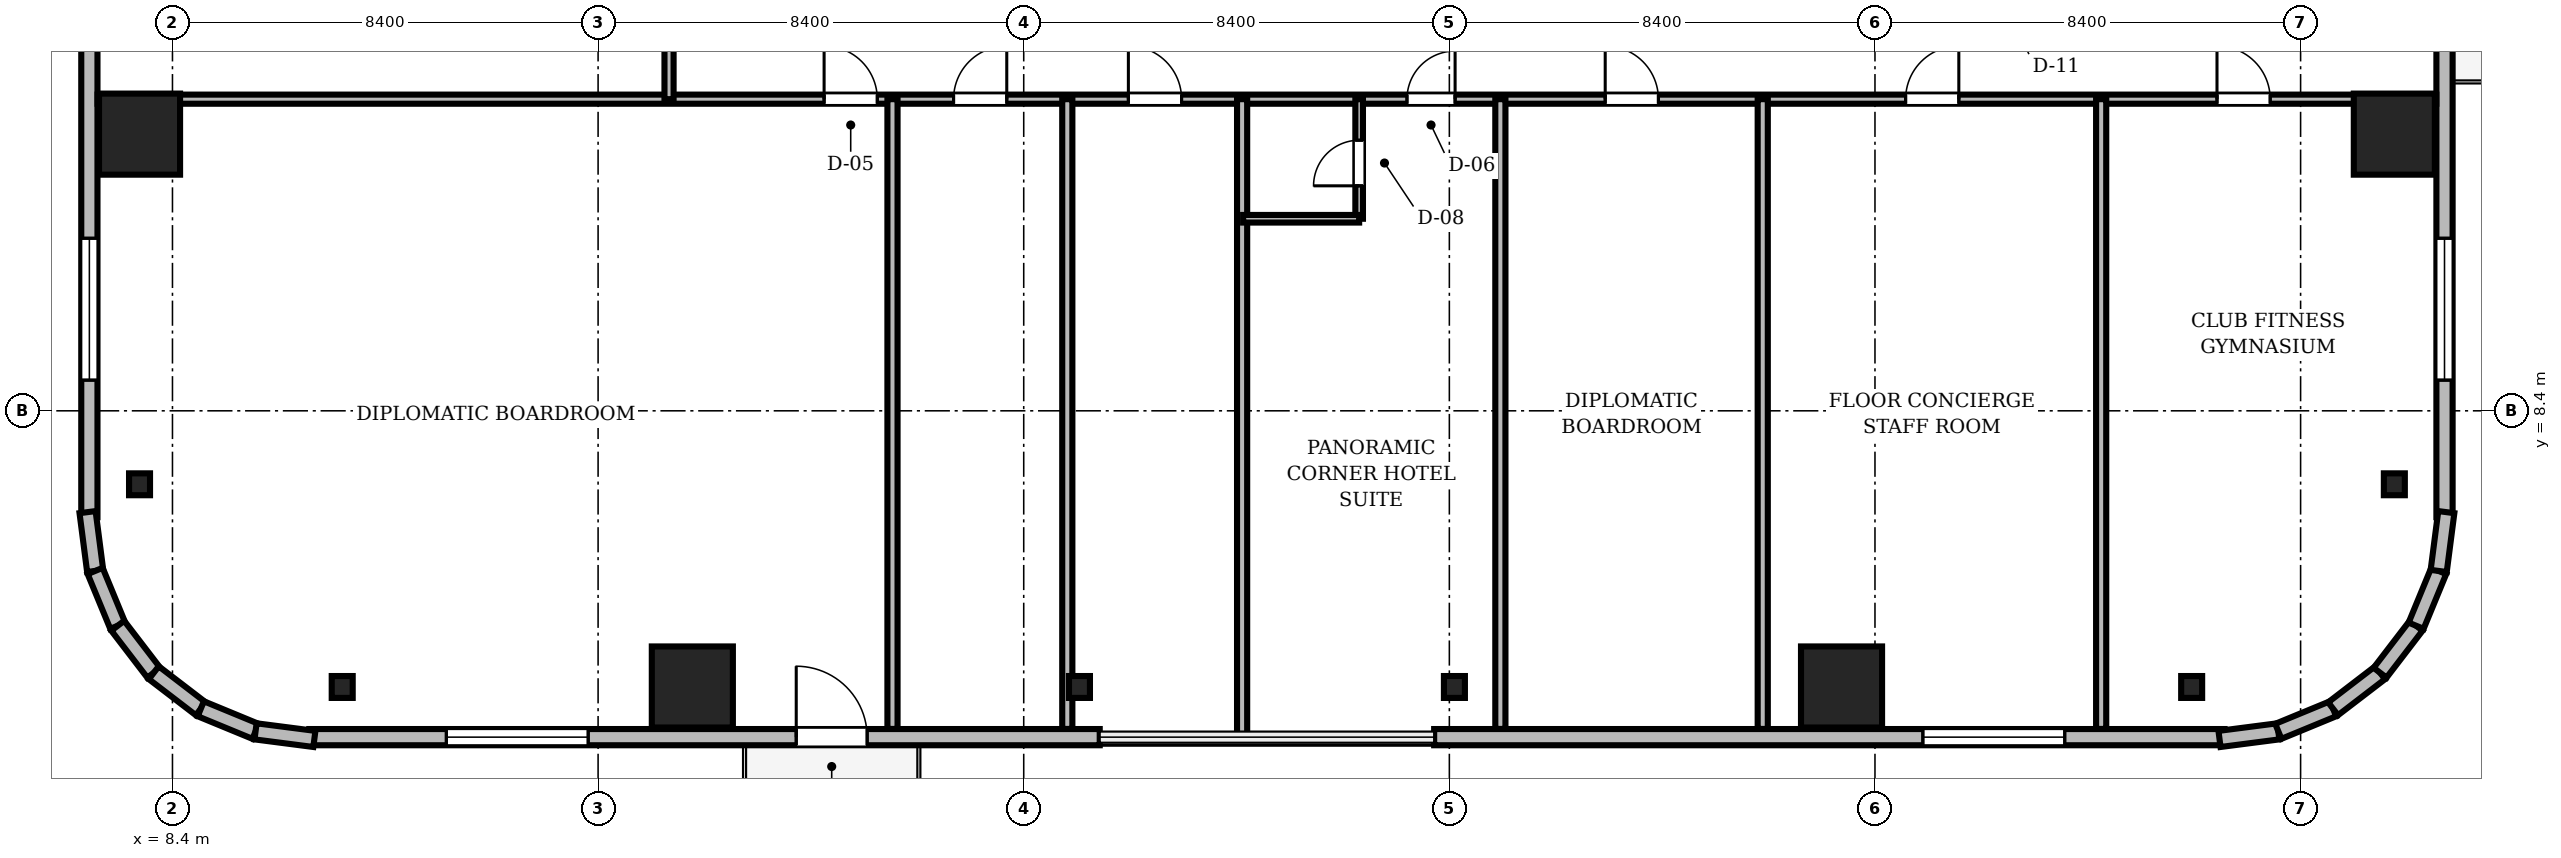
"""IFC4 building model, lengths in metres.
Left out: names, types, materials, properties, quantities, classifications, styles, units other than length and angle.
Written with IfcOpenShell. Run it as: python <this file> out.ifc"""

import sys

from ifc_helpers import new_model, si_unit, direction, frame, frame_2d, origin, origin_2d, place, context, subcontext, project, spatial, rectangle, i_section, extrude, source, transform, mapped, element, fill, save


model = new_model("IFC4")
c1 = context("Model", 3, precision=1e-05, world=origin(), true_north=direction((0.0, 1.0)))
c2 = subcontext(c1, "Body", "Model", "MODEL_VIEW")
j1 = project(units=[si_unit("LENGTHUNIT", "METRE"), si_unit("PLANEANGLEUNIT", "RADIAN")], contexts=[c1])
p1 = place(None, origin())
s1 = spatial("IfcSite", under=j1, at=p1, CompositionType="ELEMENT")
p2 = place(p1, origin())
s2 = spatial("IfcBuilding", under=s1, at=p2, CompositionType="ELEMENT")
p3 = place(p2, frame((0.0, 0.0, 111.3)))
s3 = spatial("IfcBuildingStorey", under=s2, at=p3, CompositionType="ELEMENT", Elevation=111.3)
m1 = source(origin(), c2, "Body", "SweptSolid", [
    extrude(rectangle(XDim=1.6, YDim=1.6, at=origin_2d()), origin(), (0.0, 0.0, 1.0), 3.46),
])
for number, where, z_axis, x_axis in (
    (1, (18.66, 2.95, 0.0), (0.0, 0.0, 1.0), (1.0, 0.0, 0.0)),
    (2, (41.34, 2.95, 0.0), (0.0, 0.0, 1.0), (1.0, 0.0, 0.0)),
    (3, (52.25, 13.86, 0.0), (0.0, 0.0, 1.0), (1.0, 0.0, 0.0)),
    (4, (7.75, 13.86, 0.0), (0.0, 0.0, 1.0), (1.0, 0.0, 0.0)),
):
    element("IfcColumn", number, at=place(p3, frame(where, z_axis=z_axis, x_axis=x_axis)), inside=s3, PredefinedType="COLUMN", context=c2, shape_type="MappedRepresentation", body=[
        mapped(m1, transform((0.0, 0.0, 0.0), scale=1.0)),
    ])
m2 = source(origin(), c2, "Body", "SweptSolid", [
    extrude(i_section(OverallWidth=0.414, OverallDepth=0.432, WebThickness=0.026, FlangeThickness=0.04, FilletRadius=0.015, at=origin_2d()), origin(), (0.0, 0.0, 1.0), 3.46),
])
for number, where, z_axis, x_axis in (
    (5, (11.75, 2.95, 0.0), (0.0, 0.0, 1.0), (1.0, 0.0, 0.0)),
    (6, (26.3, 2.95, 0.0), (0.0, 0.0, 1.0), (1.0, 0.0, 0.0)),
    (7, (33.7, 2.95, 0.0), (0.0, 0.0, 1.0), (1.0, 0.0, 0.0)),
    (8, (48.25, 2.95, 0.0), (0.0, 0.0, 1.0), (1.0, 0.0, 0.0)),
    (9, (52.25, 6.95, 0.0), (0.0, 0.0, 1.0), (1.0, 0.0, 0.0)),
    (10, (7.75, 6.95, 0.0), (0.0, 0.0, 1.0), (1.0, 0.0, 0.0)),
):
    element("IfcColumn", number, at=place(p3, frame(where, z_axis=z_axis, x_axis=x_axis)), inside=s3, PredefinedType="COLUMN", context=c2, shape_type="MappedRepresentation", body=[
        mapped(m2, transform((0.0, 0.0, 0.0), scale=1.0)),
    ])
m3 = source(origin(), c2, "Body", "SweptSolid", [
    extrude(rectangle(XDim=15.6, YDim=0.32, at=frame_2d((7.8, 0.0))), origin(), (0.0, 0.0, 1.0), 3.46),
])
p4 = place(p3, frame((11.1, 1.96, 0.0), z_axis=(0.0, 0.0, 1.0), x_axis=(1.0, 0.0, 0.0)))
e11 = element("IfcWall", 11, at=p4, inside=s3, PredefinedType="SOLIDWALL", context=c2, shape_type="MappedRepresentation", body=[
    mapped(m3, transform((0.0, 0.0, 0.0), scale=1.0)),
])
m4 = source(origin(), c2, "Body", "SweptSolid", [
    extrude(rectangle(XDim=1.4, YDim=2.3, at=frame_2d((0.7, 1.15))), frame((0.0, 0.17, 0.0), z_axis=(0.0, -1.0, 0.0), x_axis=(1.0, 0.0, 0.0)), (0.0, 0.0, 1.0), 0.34),
])
p5 = place(p4, frame((9.61, 0.0, 0.0)))
e12 = element("IfcOpeningElement", 12, at=p5, cuts=e11, PredefinedType="OPENING", context=c2, shape_type="MappedRepresentation", body=[
    mapped(m4, transform((0.0, 0.0, 0.0), scale=1.0)),
])
m5 = source(origin(), c2, "Body", "SweptSolid", [
    extrude(rectangle(XDim=2.8, YDim=2.4, at=frame_2d((1.4, 1.2))), frame((0.0, 0.17, 0.0), z_axis=(0.0, -1.0, 0.0), x_axis=(1.0, 0.0, 0.0)), (0.0, 0.0, 1.0), 0.34),
])
p6 = place(p4, frame((2.705, 0.0, 0.72)))
e13 = element("IfcOpeningElement", 13, at=p6, cuts=e11, PredefinedType="OPENING", context=c2, shape_type="MappedRepresentation", body=[
    mapped(m5, transform((0.0, 0.0, 0.0), scale=1.0)),
])
p7 = place(p3, frame((33.3, 1.96, 0.0), z_axis=(0.0, 0.0, 1.0), x_axis=(1.0, 0.0, 0.0)))
e14 = element("IfcWall", 14, at=p7, inside=s3, PredefinedType="SOLIDWALL", context=c2, shape_type="MappedRepresentation", body=[
    mapped(m3, transform((0.0, 0.0, 0.0), scale=1.0)),
])
p8 = place(p7, frame((9.645, 0.0, 0.72)))
e15 = element("IfcOpeningElement", 15, at=p8, cuts=e14, PredefinedType="OPENING", context=c2, shape_type="MappedRepresentation", body=[
    mapped(m5, transform((0.0, 0.0, 0.0), scale=1.0)),
])
p9 = place(p3, frame((6.76, 21.9, 0.0), z_axis=(0.0, 0.0, 1.0), x_axis=(0.0, -1.0, 0.0)))
e16 = element("IfcWall", 16, at=p9, inside=s3, PredefinedType="SOLIDWALL", context=c2, shape_type="MappedRepresentation", body=[
    mapped(m3, transform((0.0, 0.0, 0.0), scale=1.0)),
])
p10 = place(p9, frame((10.095, 0.0, 0.72)))
e17 = element("IfcOpeningElement", 17, at=p10, cuts=e16, PredefinedType="OPENING", context=c2, shape_type="MappedRepresentation", body=[
    mapped(m5, transform((0.0, 0.0, 0.0), scale=1.0)),
])
p11 = place(p3, frame((53.24, 6.3, 0.0), z_axis=(0.0, 0.0, 1.0), x_axis=(0.0, 1.0, 0.0)))
e18 = element("IfcWall", 18, at=p11, inside=s3, PredefinedType="SOLIDWALL", context=c2, shape_type="MappedRepresentation", body=[
    mapped(m3, transform((0.0, 0.0, 0.0), scale=1.0)),
])
p12 = place(p11, frame((9.61, 0.0, 0.0)))
e19 = element("IfcOpeningElement", 19, at=p12, cuts=e18, PredefinedType="OPENING", context=c2, shape_type="MappedRepresentation", body=[
    mapped(m4, transform((0.0, 0.0, 0.0), scale=1.0)),
])
p13 = place(p11, frame((2.705, 0.0, 0.72)))
e20 = element("IfcOpeningElement", 20, at=p13, cuts=e18, PredefinedType="OPENING", context=c2, shape_type="MappedRepresentation", body=[
    mapped(m5, transform((0.0, 0.0, 0.0), scale=1.0)),
])
m6 = source(origin(), c2, "Body", "SweptSolid", [
    extrude(rectangle(XDim=1.171, YDim=0.32, at=frame_2d((0.585, 0.0))), origin(), (0.0, 0.0, 1.0), 3.46),
])
p14 = place(p3, frame((6.724, 6.401, 0.0), z_axis=(0.0, 0.0, 1.0), x_axis=(0.128269133229, -0.991739395941, 0.0)))
e21 = element("IfcWall", 21, at=p14, inside=s3, PredefinedType="SOLIDWALL", context=c2, shape_type="MappedRepresentation", body=[
    mapped(m6, transform((0.0, 0.0, 0.0), scale=1.0)),
])
m7 = source(origin(), c2, "Body", "SweptSolid", [
    extrude(rectangle(XDim=1.169, YDim=0.32, at=frame_2d((0.584, 0.0))), origin(), (0.0, 0.0, 1.0), 3.46),
])
for number, where, z_axis, x_axis in (
    (22, (6.875, 5.24, 0.0), (0.0, 0.0, 1.0), (0.381, -0.925, 0.0)),
    (23, (7.32, 4.159, 0.0), (0.0, 0.0, 1.0), (0.608, -0.794, 0.0)),
):
    element("IfcWall", number, at=place(p3, frame(where, z_axis=z_axis, x_axis=x_axis)), inside=s3, PredefinedType="SOLIDWALL", context=c2, shape_type="MappedRepresentation", body=[
        mapped(m7, transform((0.0, 0.0, 0.0), scale=1.0)),
    ])
m8 = source(origin(), c2, "Body", "SweptSolid", [
    extrude(rectangle(XDim=1.169, YDim=0.32, at=frame_2d((0.584, 0.0))), origin(), (0.0, 0.0, 1.0), 3.46),
])
p15 = place(p3, frame((8.031, 3.231, 0.0), z_axis=(0.0, 0.0, 1.0), x_axis=(0.793663520347, -0.608356981114, 0.0)))
e24 = element("IfcWall", 24, at=p15, inside=s3, PredefinedType="SOLIDWALL", context=c2, shape_type="MappedRepresentation", body=[
    mapped(m8, transform((0.0, 0.0, 0.0), scale=1.0)),
])
m9 = source(origin(), c2, "Body", "SweptSolid", [
    extrude(rectangle(XDim=1.169, YDim=0.32, at=frame_2d((0.585, 0.0))), origin(), (0.0, 0.0, 1.0), 3.46),
])
p16 = place(p3, frame((8.959, 2.52, 0.0), z_axis=(0.0, 0.0, 1.0), x_axis=(0.924479075121, -0.381232789334, 0.0)))
e25 = element("IfcWall", 25, at=p16, inside=s3, PredefinedType="SOLIDWALL", context=c2, shape_type="MappedRepresentation", body=[
    mapped(m9, transform((0.0, 0.0, 0.0), scale=1.0)),
])
m10 = source(origin(), c2, "Body", "SweptSolid", [
    extrude(rectangle(XDim=1.17, YDim=0.32, at=frame_2d((0.585, 0.0))), origin(), (0.0, 0.0, 1.0), 3.46),
])
for number, where, z_axis, x_axis in (
    (26, (10.04, 2.074, 0.0), (0.0, 0.0, 1.0), (0.992, -0.128, 0.0)),
    (27, (48.8, 1.925, 0.0), (0.0, 0.0, 1.0), (0.992, 0.128, 0.0)),
):
    element("IfcWall", number, at=place(p3, frame(where, z_axis=z_axis, x_axis=x_axis)), inside=s3, PredefinedType="SOLIDWALL", context=c2, shape_type="MappedRepresentation", body=[
        mapped(m10, transform((0.0, 0.0, 0.0), scale=1.0)),
    ])
p17 = place(p3, frame((49.96, 2.074, 0.0), z_axis=(0.0, 0.0, 1.0), x_axis=(0.924479075121, 0.381232789334, 0.0)))
e28 = element("IfcWall", 28, at=p17, inside=s3, PredefinedType="SOLIDWALL", context=c2, shape_type="MappedRepresentation", body=[
    mapped(m9, transform((0.0, 0.0, 0.0), scale=1.0)),
])
p18 = place(p3, frame((51.041, 2.52, 0.0), z_axis=(0.0, 0.0, 1.0), x_axis=(0.793663520347, 0.608356981114, 0.0)))
e29 = element("IfcWall", 29, at=p18, inside=s3, PredefinedType="SOLIDWALL", context=c2, shape_type="MappedRepresentation", body=[
    mapped(m8, transform((0.0, 0.0, 0.0), scale=1.0)),
])
for number, where, z_axis, x_axis in (
    (30, (51.969, 3.231, 0.0), (0.0, 0.0, 1.0), (0.608, 0.794, 0.0)),
    (31, (52.68, 4.159, 0.0), (0.0, 0.0, 1.0), (0.381, 0.925, 0.0)),
):
    element("IfcWall", number, at=place(p3, frame(where, z_axis=z_axis, x_axis=x_axis)), inside=s3, PredefinedType="SOLIDWALL", context=c2, shape_type="MappedRepresentation", body=[
        mapped(m7, transform((0.0, 0.0, 0.0), scale=1.0)),
    ])
p19 = place(p3, frame((53.125, 5.24, 0.0), z_axis=(0.0, 0.0, 1.0), x_axis=(0.128269133229, 0.991739395941, 0.0)))
e32 = element("IfcWall", 32, at=p19, inside=s3, PredefinedType="SOLIDWALL", context=c2, shape_type="MappedRepresentation", body=[
    mapped(m6, transform((0.0, 0.0, 0.0), scale=1.0)),
])
m11 = source(origin(), c2, "Body", "SweptSolid", [
    extrude(rectangle(XDim=46.156, YDim=0.18, at=frame_2d((23.078, 0.0))), origin(), (0.0, 0.0, 1.0), 2.702),
])
p20 = place(p3, frame((6.922, 14.55, 0.0), z_axis=(0.0, 0.0, 1.0), x_axis=(1.0, 0.0, 0.0)))
e33 = element("IfcWall", 33, at=p20, inside=s3, PredefinedType="PARTITIONING", context=c2, shape_type="MappedRepresentation", body=[
    mapped(m11, transform((0.0, 0.0, 0.0), scale=1.0)),
])
m12 = source(origin(), c2, "Body", "SweptSolid", [
    extrude(rectangle(XDim=1.05, YDim=2.2, at=frame_2d((0.525, 1.1))), frame((0.0, 0.1, 0.0), z_axis=(0.0, -1.0, 0.0), x_axis=(1.0, 0.0, 0.0)), (0.0, 0.0, 1.0), 0.2),
])
p21 = place(p20, frame((14.338, 0.0, 0.0)))
e34 = element("IfcOpeningElement", 34, at=p21, cuts=e33, PredefinedType="OPENING", context=c2, shape_type="MappedRepresentation", body=[
    mapped(m12, transform((0.0, 0.0, 0.0), scale=1.0)),
])
p22 = place(p20, frame((16.893, 0.0, 0.0)))
e35 = element("IfcOpeningElement", 35, at=p22, cuts=e33, PredefinedType="OPENING", context=c2, shape_type="MappedRepresentation", body=[
    mapped(m12, transform((0.0, 0.0, 0.0), scale=1.0)),
])
p23 = place(p20, frame((20.344, 0.0, 0.0)))
e36 = element("IfcOpeningElement", 36, at=p23, cuts=e33, PredefinedType="OPENING", context=c2, shape_type="MappedRepresentation", body=[
    mapped(m12, transform((0.0, 0.0, 0.0), scale=1.0)),
])
m13 = source(origin(), c2, "Body", "SweptSolid", [
    extrude(rectangle(XDim=0.95, YDim=2.15, at=frame_2d((0.475, 1.075))), frame((0.0, 0.1, 0.0), z_axis=(0.0, -1.0, 0.0), x_axis=(1.0, 0.0, 0.0)), (0.0, 0.0, 1.0), 0.2),
])
p24 = place(p20, frame((25.842, 0.0, 0.0)))
e37 = element("IfcOpeningElement", 37, at=p24, cuts=e33, PredefinedType="OPENING", context=c2, shape_type="MappedRepresentation", body=[
    mapped(m13, transform((0.0, 0.0, 0.0), scale=1.0)),
])
p25 = place(p20, frame((29.754, 0.0, 0.0)))
e38 = element("IfcOpeningElement", 38, at=p25, cuts=e33, PredefinedType="OPENING", context=c2, shape_type="MappedRepresentation", body=[
    mapped(m12, transform((0.0, 0.0, 0.0), scale=1.0)),
])
p26 = place(p20, frame((35.683, 0.0, 0.0)))
e39 = element("IfcOpeningElement", 39, at=p26, cuts=e33, PredefinedType="OPENING", context=c2, shape_type="MappedRepresentation", body=[
    mapped(m12, transform((0.0, 0.0, 0.0), scale=1.0)),
])
p27 = place(p20, frame((41.828, 0.0, 0.0)))
e40 = element("IfcOpeningElement", 40, at=p27, cuts=e33, PredefinedType="OPENING", context=c2, shape_type="MappedRepresentation", body=[
    mapped(m12, transform((0.0, 0.0, 0.0), scale=1.0)),
])
m14 = source(origin(), c2, "Body", "SweptSolid", [
    extrude(rectangle(XDim=2.36, YDim=0.15, at=frame_2d((1.18, 0.0))), origin(), (0.0, 0.0, 1.0), 3.46),
])
p28 = place(p3, frame((31.82, 12.19, 0.0), z_axis=(0.0, 0.0, 1.0), x_axis=(0.0, 1.0, 0.0)))
e41 = element("IfcWall", 41, at=p28, inside=s3, PredefinedType="PARTITIONING", context=c2, shape_type="MappedRepresentation", body=[
    mapped(m14, transform((0.0, 0.0, 0.0), scale=1.0)),
])
m15 = source(origin(), c2, "Body", "SweptSolid", [
    extrude(rectangle(XDim=0.9, YDim=2.1, at=frame_2d((0.45, 1.05))), frame((0.0, 0.085, 0.0), z_axis=(0.0, -1.0, 0.0), x_axis=(1.0, 0.0, 0.0)), (0.0, 0.0, 1.0), 0.17),
])
p29 = place(p28, frame((0.65, 0.0, 0.0)))
e42 = element("IfcOpeningElement", 42, at=p29, cuts=e41, PredefinedType="OPENING", context=c2, shape_type="MappedRepresentation", body=[
    mapped(m15, transform((0.0, 0.0, 0.0), scale=1.0)),
])
m16 = source(origin(), c2, "Body", "SweptSolid", [
    extrude(rectangle(XDim=14.0, YDim=0.18, at=frame_2d((7.0, 0.0))), origin(), (0.0, 0.0, 1.0), 2.852),
])
p30 = place(p3, frame((18.2, 14.55, 0.0), z_axis=(0.0, 0.0, 1.0), x_axis=(0.0, 1.0, 0.0)))
e43 = element("IfcWall", 43, at=p30, inside=s3, PredefinedType="PARTITIONING", context=c2, shape_type="MappedRepresentation", body=[
    mapped(m16, transform((0.0, 0.0, 0.0), scale=1.0)),
])
m17 = source(origin(), c2, "Body", "SweptSolid", [
    extrude(rectangle(XDim=12.428, YDim=0.2, at=frame_2d((6.214, 0.0))), origin(), (0.0, 0.0, 1.0), 2.702),
])
for number, where, z_axis, x_axis in (
    (44, (22.61, 2.122, 0.0), (0.0, 0.0, 1.0), (0.0, 1.0, 0.0)),
    (45, (26.06, 2.122, 0.0), (0.0, 0.0, 1.0), (0.0, 1.0, 0.0)),
):
    element("IfcWall", number, at=place(p3, frame(where, z_axis=z_axis, x_axis=x_axis)), inside=s3, PredefinedType="PARTITIONING", context=c2, shape_type="MappedRepresentation", body=[
        mapped(m17, transform((0.0, 0.0, 0.0), scale=1.0)),
    ])
m18 = source(origin(), c2, "Body", "SweptSolid", [
    extrude(rectangle(XDim=12.62, YDim=0.2, at=frame_2d((6.31, 0.0))), origin(), (0.0, 0.0, 1.0), 2.702),
])
p31 = place(p3, frame((29.51, 1.93, 0.0), z_axis=(0.0, 0.0, 1.0), x_axis=(0.0, 1.0, 0.0)))
e46 = element("IfcWall", 46, at=p31, inside=s3, PredefinedType="PARTITIONING", context=c2, shape_type="MappedRepresentation", body=[
    mapped(m18, transform((0.0, 0.0, 0.0), scale=1.0)),
])
for number, where, z_axis, x_axis in (
    (47, (34.607, 2.122, 0.0), (0.0, 0.0, 1.0), (0.0, 1.0, 0.0)),
    (48, (39.785, 2.122, 0.0), (0.0, 0.0, 1.0), (0.0, 1.0, 0.0)),
    (49, (46.464, 2.122, 0.0), (0.0, 0.0, 1.0), (0.0, 1.0, 0.0)),
):
    element("IfcWall", number, at=place(p3, frame(where, z_axis=z_axis, x_axis=x_axis)), inside=s3, PredefinedType="PARTITIONING", context=c2, shape_type="MappedRepresentation", body=[
        mapped(m17, transform((0.0, 0.0, 0.0), scale=1.0)),
    ])
m19 = source(origin(), c2, "Body", "SweptSolid", [
    extrude(rectangle(XDim=2.29, YDim=0.15, at=frame_2d((1.145, 0.0))), origin(), (0.0, 0.0, 1.0), 2.852),
])
p32 = place(p3, frame((29.53, 12.19, 0.0), z_axis=(0.0, 0.0, 1.0), x_axis=(1.0, 0.0, 0.0)))
e50 = element("IfcWall", 50, at=p32, inside=s3, PredefinedType="PARTITIONING", context=c2, shape_type="MappedRepresentation", body=[
    mapped(m19, transform((0.0, 0.0, 0.0), scale=1.0)),
])
m20 = source(origin(), c2, "Body", "SweptSolid", [
    extrude(rectangle(XDim=1.4, YDim=2.3, at=frame_2d((0.7, 1.15))), frame((0.0, 0.025, 0.0), z_axis=(0.0, -1.0, 0.0), x_axis=(1.0, 0.0, 0.0)), (0.0, 0.0, 1.0), 0.05),
])
p33 = place(p5, frame((1.4, 0.0, 0.0), z_axis=(0.0, 0.0, 1.0), x_axis=(-1.0, 0.0, 0.0)))
e51 = element("IfcDoor", 51, at=p33, inside=s3, OperationType="DOUBLE_DOOR_SLIDING", PredefinedType="DOOR", context=c2, shape_type="MappedRepresentation", body=[
    mapped(m20, transform((0.0, 0.0, 0.0), scale=1.0)),
])
fill(e12, e51)
m21 = source(origin(), c2, "Body", "SweptSolid", [
    extrude(rectangle(XDim=2.8, YDim=2.4, at=frame_2d((1.4, 1.2))), frame((0.0, 0.03, 0.0), z_axis=(0.0, -1.0, 0.0), x_axis=(1.0, 0.0, 0.0)), (0.0, 0.0, 1.0), 0.06),
])
p34 = place(p6, origin())
e52 = element("IfcWindow", 52, at=p34, inside=s3, PartitioningType="SINGLE_PANEL", PredefinedType="WINDOW", context=c2, shape_type="MappedRepresentation", body=[
    mapped(m21, transform((0.0, 0.0, 0.0), scale=1.0)),
])
fill(e13, e52)
p35 = place(p8, origin())
e53 = element("IfcWindow", 53, at=p35, inside=s3, PartitioningType="SINGLE_PANEL", PredefinedType="WINDOW", context=c2, shape_type="MappedRepresentation", body=[
    mapped(m21, transform((0.0, 0.0, 0.0), scale=1.0)),
])
fill(e15, e53)
p36 = place(p10, origin())
e54 = element("IfcWindow", 54, at=p36, inside=s3, PartitioningType="SINGLE_PANEL", PredefinedType="WINDOW", context=c2, shape_type="MappedRepresentation", body=[
    mapped(m21, transform((0.0, 0.0, 0.0), scale=1.0)),
])
fill(e17, e54)
p37 = place(p13, origin())
e55 = element("IfcWindow", 55, at=p37, inside=s3, PartitioningType="SINGLE_PANEL", PredefinedType="WINDOW", context=c2, shape_type="MappedRepresentation", body=[
    mapped(m21, transform((0.0, 0.0, 0.0), scale=1.0)),
])
fill(e20, e55)
m22 = source(origin(), c2, "Body", "SweptSolid", [
    extrude(rectangle(XDim=1.05, YDim=2.2, at=frame_2d((0.525, 1.1))), frame((0.0, 0.025, 0.0), z_axis=(0.0, -1.0, 0.0), x_axis=(1.0, 0.0, 0.0)), (0.0, 0.0, 1.0), 0.05),
])
p38 = place(p21, origin())
e56 = element("IfcDoor", 56, at=p38, inside=s3, OperationType="SINGLE_SWING_LEFT", PredefinedType="DOOR", context=c2, shape_type="MappedRepresentation", body=[
    mapped(m22, transform((0.0, 0.0, 0.0), scale=1.0)),
])
fill(e34, e56)
p39 = place(p22, origin())
e57 = element("IfcDoor", 57, at=p39, inside=s3, OperationType="SINGLE_SWING_RIGHT", PredefinedType="DOOR", context=c2, shape_type="MappedRepresentation", body=[
    mapped(m22, transform((0.0, 0.0, 0.0), scale=1.0)),
])
fill(e35, e57)
p40 = place(p23, origin())
e58 = element("IfcDoor", 58, at=p40, inside=s3, OperationType="SINGLE_SWING_LEFT", PredefinedType="DOOR", context=c2, shape_type="MappedRepresentation", body=[
    mapped(m22, transform((0.0, 0.0, 0.0), scale=1.0)),
])
fill(e36, e58)
m23 = source(origin(), c2, "Body", "SweptSolid", [
    extrude(rectangle(XDim=0.95, YDim=2.15, at=frame_2d((0.475, 1.075))), frame((0.0, 0.025, 0.0), z_axis=(0.0, -1.0, 0.0), x_axis=(1.0, 0.0, 0.0)), (0.0, 0.0, 1.0), 0.05),
])
p41 = place(p24, origin())
e59 = element("IfcDoor", 59, at=p41, inside=s3, OperationType="SINGLE_SWING_RIGHT", PredefinedType="DOOR", context=c2, shape_type="MappedRepresentation", body=[
    mapped(m23, transform((0.0, 0.0, 0.0), scale=1.0)),
])
fill(e37, e59)
p42 = place(p25, origin())
e60 = element("IfcDoor", 60, at=p42, inside=s3, OperationType="SINGLE_SWING_LEFT", PredefinedType="DOOR", context=c2, shape_type="MappedRepresentation", body=[
    mapped(m22, transform((0.0, 0.0, 0.0), scale=1.0)),
])
fill(e38, e60)
p43 = place(p26, origin())
e61 = element("IfcDoor", 61, at=p43, inside=s3, OperationType="SINGLE_SWING_RIGHT", PredefinedType="DOOR", context=c2, shape_type="MappedRepresentation", body=[
    mapped(m22, transform((0.0, 0.0, 0.0), scale=1.0)),
])
fill(e39, e61)
p44 = place(p27, origin())
e62 = element("IfcDoor", 62, at=p44, inside=s3, OperationType="SINGLE_SWING_LEFT", PredefinedType="DOOR", context=c2, shape_type="MappedRepresentation", body=[
    mapped(m22, transform((0.0, 0.0, 0.0), scale=1.0)),
])
fill(e40, e62)
m24 = source(origin(), c2, "Body", "SweptSolid", [
    extrude(rectangle(XDim=0.9, YDim=2.1, at=frame_2d((0.45, 1.05))), frame((0.0, 0.025, 0.0), z_axis=(0.0, -1.0, 0.0), x_axis=(1.0, 0.0, 0.0)), (0.0, 0.0, 1.0), 0.05),
])
p45 = place(p29, origin())
e63 = element("IfcDoor", 63, at=p45, inside=s3, OperationType="SINGLE_SWING_LEFT", PredefinedType="DOOR", context=c2, shape_type="MappedRepresentation", body=[
    mapped(m24, transform((0.0, 0.0, 0.0), scale=1.0)),
])
fill(e42, e63)
save(model, sys.argv[1])
